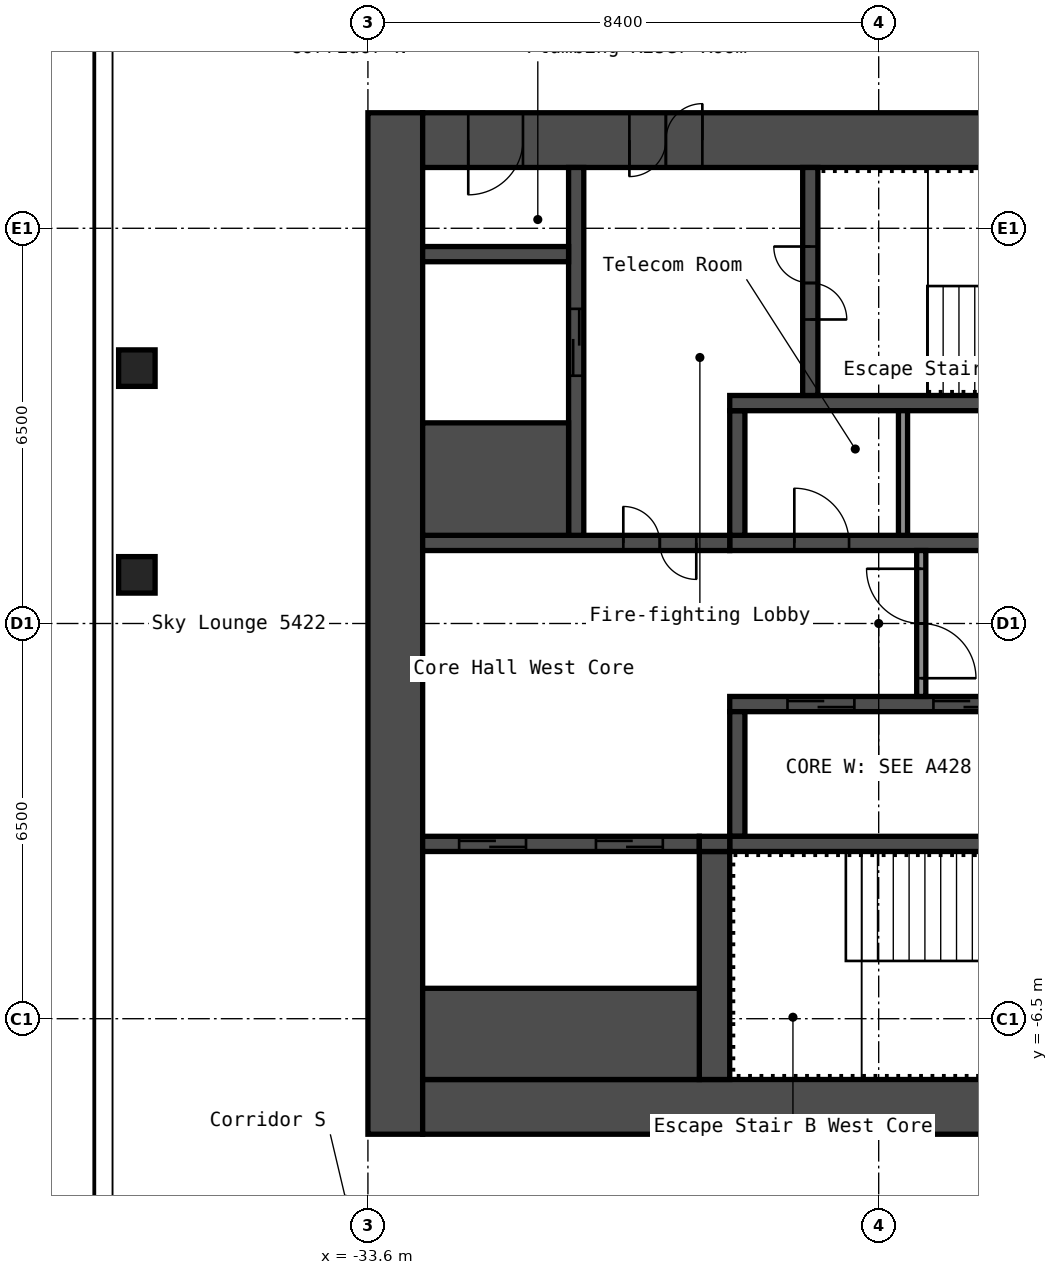
"""IFC4 building model, lengths in metres.
Left out: names, types, materials, properties, quantities, classifications, styles, units other than length and angle.
Written with IfcOpenShell. Run it as: python <this file> out.ifc"""

import sys

from ifc_helpers import new_model, si_unit, direction, frame, frame_2d, origin, origin_2d, place, context, subcontext, project, spatial, rectangle, hollow_rectangle, extrude, element, fill, save


model = new_model("IFC4")
c1 = context("Model", 3, precision=1e-05, world=origin(), true_north=direction((0.0, 1.0)))
c2 = subcontext(c1, "Body", "Model", "MODEL_VIEW")
j1 = project(units=[si_unit("LENGTHUNIT", "METRE"), si_unit("PLANEANGLEUNIT", "RADIAN")], contexts=[c1])
p1 = place(None, origin())
s1 = spatial("IfcSite", under=j1, at=p1, CompositionType="ELEMENT")
p2 = place(p1, origin())
s2 = spatial("IfcBuilding", under=s1, at=p2, CompositionType="ELEMENT")
p3 = place(p2, frame((0.0, 0.0, 193.0)))
s3 = spatial("IfcBuildingStorey", under=s2, at=p3, CompositionType="ELEMENT", Elevation=193.0)
for number, where, z_axis, x_axis in (
    (1, (-37.4, 0.8, 0.0), (0.0, 0.0, 1.0), (1.0, 0.0, 0.0)),
    (2, (-37.4, 4.2, 0.0), (0.0, 0.0, 1.0), (1.0, 0.0, 0.0)),
):
    element("IfcColumn", number, at=place(p3, frame(where, z_axis=z_axis, x_axis=x_axis)), inside=s3, PredefinedType="COLUMN", context=c2, shape_type="SweptSolid", body=[
        extrude(hollow_rectangle(XDim=0.6, YDim=0.6, WallThickness=0.025, InnerFilletRadius=0.038, OuterFilletRadius=0.062, at=origin_2d()), origin(), (0.0, 0.0, 1.0), 2.75),
    ])
p4 = place(p3, frame((-33.15, -8.4, 0.0), z_axis=(0.0, 0.0, 1.0), x_axis=(0.0, 1.0, 0.0)))
e3 = element("IfcWall", 3, at=p4, inside=s3, PredefinedType="SHEAR", context=c2, shape_type="SweptSolid", body=[
    extrude(rectangle(XDim=16.8, YDim=0.9, at=frame_2d((8.4, 0.0))), origin(), (0.0, 0.0, 1.0), 2.75),
])
p5 = place(p3, frame((-32.7, 7.95, 0.0), z_axis=(0.0, 0.0, 1.0), x_axis=(1.0, 0.0, 0.0)))
e4 = element("IfcWall", 4, at=p5, inside=s3, PredefinedType="SHEAR", context=c2, shape_type="SweptSolid", body=[
    extrude(rectangle(XDim=15.0, YDim=0.9, at=frame_2d((7.5, 0.0))), origin(), (0.0, 0.0, 1.0), 2.75),
])
p6 = place(p5, frame((3.4, 0.0, 0.0)))
e5 = element("IfcOpeningElement", 5, at=p6, cuts=e4, PredefinedType="OPENING", context=c2, shape_type="SweptSolid", body=[
    extrude(rectangle(XDim=1.2, YDim=2.1, at=frame_2d((0.6, 1.05))), frame((0.0, 0.46, 0.0), z_axis=(0.0, -1.0, 0.0), x_axis=(1.0, 0.0, 0.0)), (0.0, 0.0, 1.0), 0.92),
])
p7 = place(p5, frame((0.75, 0.0, 0.0)))
e6 = element("IfcOpeningElement", 6, at=p7, cuts=e4, PredefinedType="OPENING", context=c2, shape_type="SweptSolid", body=[
    extrude(rectangle(XDim=0.9, YDim=2.1, at=frame_2d((0.45, 1.05))), frame((0.0, 0.46, 0.0), z_axis=(0.0, -1.0, 0.0), x_axis=(1.0, 0.0, 0.0)), (0.0, 0.0, 1.0), 0.92),
])
p8 = place(p3, frame((-32.7, -7.95, 0.0), z_axis=(0.0, 0.0, 1.0), x_axis=(1.0, 0.0, 0.0)))
e7 = element("IfcWall", 7, at=p8, inside=s3, PredefinedType="SHEAR", context=c2, shape_type="SweptSolid", body=[
    extrude(rectangle(XDim=15.0, YDim=0.9, at=frame_2d((7.5, 0.0))), origin(), (0.0, 0.0, 1.0), 2.75),
])
p9 = place(p8, frame((11.45, 0.0, 0.0)))
e8 = element("IfcOpeningElement", 8, at=p9, cuts=e7, PredefinedType="OPENING", context=c2, shape_type="SweptSolid", body=[
    extrude(rectangle(XDim=1.0, YDim=2.1, at=frame_2d((0.5, 1.05))), frame((0.0, 0.46, 0.0), z_axis=(0.0, -1.0, 0.0), x_axis=(1.0, 0.0, 0.0)), (0.0, 0.0, 1.0), 0.92),
])
p10 = place(p3, frame((-27.65, 1.325, 0.0), z_axis=(0.0, 0.0, 1.0), x_axis=(1.0, 0.0, 0.0)))
e9 = element("IfcWall", 9, at=p10, inside=s3, PredefinedType="SHEAR", context=c2, shape_type="SweptSolid", body=[
    extrude(rectangle(XDim=7.5, YDim=0.25, at=frame_2d((3.75, 0.0))), origin(), (0.0, 0.0, 1.0), 2.75),
])
p11 = place(p10, frame((4.762, 0.0, 0.0)))
e10 = element("IfcOpeningElement", 10, at=p11, cuts=e9, PredefinedType="OPENING", context=c2, shape_type="SweptSolid", body=[
    extrude(rectangle(XDim=0.9, YDim=2.1, at=frame_2d((0.45, 1.05))), frame((0.0, 0.135, 0.0), z_axis=(0.0, -1.0, 0.0), x_axis=(1.0, 0.0, 0.0)), (0.0, 0.0, 1.0), 0.27),
])
p12 = place(p10, frame((1.062, 0.0, 0.0)))
e11 = element("IfcOpeningElement", 11, at=p12, cuts=e9, PredefinedType="OPENING", context=c2, shape_type="SweptSolid", body=[
    extrude(rectangle(XDim=0.9, YDim=2.1, at=frame_2d((0.45, 1.05))), frame((0.0, 0.135, 0.0), z_axis=(0.0, -1.0, 0.0), x_axis=(1.0, 0.0, 0.0)), (0.0, 0.0, 1.0), 0.27),
])
p13 = place(p3, frame((-27.525, 1.45, 0.0), z_axis=(0.0, 0.0, 1.0), x_axis=(0.0, 1.0, 0.0)))
e12 = element("IfcWall", 12, at=p13, inside=s3, PredefinedType="SHEAR", context=c2, shape_type="SweptSolid", body=[
    extrude(rectangle(XDim=2.05, YDim=0.25, at=frame_2d((1.025, 0.0))), origin(), (0.0, 0.0, 1.0), 2.75),
])
p14 = place(p3, frame((-27.65, 3.625, 0.0), z_axis=(0.0, 0.0, 1.0), x_axis=(1.0, 0.0, 0.0)))
e13 = element("IfcWall", 13, at=p14, inside=s3, PredefinedType="SHEAR", context=c2, shape_type="SweptSolid", body=[
    extrude(rectangle(XDim=7.5, YDim=0.25, at=frame_2d((3.75, 0.0))), origin(), (0.0, 0.0, 1.0), 2.75),
])
p15 = place(p3, frame((-26.325, 3.75, 0.0), z_axis=(0.0, 0.0, 1.0), x_axis=(0.0, 1.0, 0.0)))
e14 = element("IfcWall", 14, at=p15, inside=s3, PredefinedType="SHEAR", context=c2, shape_type="SweptSolid", body=[
    extrude(rectangle(XDim=3.75, YDim=0.25, at=frame_2d((1.875, 0.0))), origin(), (0.0, 0.0, 1.0), 2.75),
])
p16 = place(p15, frame((1.25, 0.0, 0.0)))
e15 = element("IfcOpeningElement", 15, at=p16, cuts=e14, PredefinedType="OPENING", context=c2, shape_type="SweptSolid", body=[
    extrude(rectangle(XDim=1.2, YDim=2.1, at=frame_2d((0.6, 1.05))), frame((0.0, 0.135, 0.0), z_axis=(0.0, -1.0, 0.0), x_axis=(1.0, 0.0, 0.0)), (0.0, 0.0, 1.0), 0.27),
])
p17 = place(p3, frame((-32.7, 1.325, 0.0), z_axis=(0.0, 0.0, 1.0), x_axis=(1.0, 0.0, 0.0)))
e16 = element("IfcWall", 16, at=p17, inside=s3, PredefinedType="SHEAR", context=c2, shape_type="SweptSolid", body=[
    extrude(rectangle(XDim=5.05, YDim=0.25, at=frame_2d((2.525, 0.0))), origin(), (0.0, 0.0, 1.0), 2.75),
])
p18 = place(p17, frame((3.3, 0.0, 0.0)))
e17 = element("IfcOpeningElement", 17, at=p18, cuts=e16, PredefinedType="OPENING", context=c2, shape_type="SweptSolid", body=[
    extrude(rectangle(XDim=1.2, YDim=2.1, at=frame_2d((0.6, 1.05))), frame((0.0, 0.135, 0.0), z_axis=(0.0, -1.0, 0.0), x_axis=(1.0, 0.0, 0.0)), (0.0, 0.0, 1.0), 0.27),
])
p19 = place(p3, frame((-30.175, 1.45, 0.0), z_axis=(0.0, 0.0, 1.0), x_axis=(0.0, 1.0, 0.0)))
e18 = element("IfcWall", 18, at=p19, inside=s3, PredefinedType="SHEAR", context=c2, shape_type="SweptSolid", body=[
    extrude(rectangle(XDim=6.05, YDim=0.25, at=frame_2d((3.025, 0.0))), origin(), (0.0, 0.0, 1.0), 2.75),
])
p20 = place(p19, frame((2.625, 0.0, 0.0)))
e19 = element("IfcOpeningElement", 19, at=p20, cuts=e18, PredefinedType="OPENING", context=c2, shape_type="SweptSolid", body=[
    extrude(rectangle(XDim=1.1, YDim=2.1, at=frame_2d((0.55, 1.05))), frame((0.0, 0.135, 0.0), z_axis=(0.0, -1.0, 0.0), x_axis=(1.0, 0.0, 0.0)), (0.0, 0.0, 1.0), 0.27),
])
p21 = place(p3, frame((-32.7, 2.375, 0.0), z_axis=(0.0, 0.0, 1.0), x_axis=(1.0, 0.0, 0.0)))
e20 = element("IfcWall", 20, at=p21, inside=s3, PredefinedType="SHEAR", context=c2, shape_type="SweptSolid", body=[
    extrude(rectangle(XDim=2.4, YDim=1.85, at=frame_2d((1.2, 0.0))), origin(), (0.0, 0.0, 1.0), 2.75),
])
p22 = place(p3, frame((-32.7, 6.075, 0.0), z_axis=(0.0, 0.0, 1.0), x_axis=(1.0, 0.0, 0.0)))
e21 = element("IfcWall", 21, at=p22, inside=s3, PredefinedType="SHEAR", context=c2, shape_type="SweptSolid", body=[
    extrude(rectangle(XDim=2.4, YDim=0.25, at=frame_2d((1.2, 0.0))), origin(), (0.0, 0.0, 1.0), 2.75),
])
p23 = place(p3, frame((-27.65, -1.325, 0.0), z_axis=(0.0, 0.0, 1.0), x_axis=(1.0, 0.0, 0.0)))
e22 = element("IfcWall", 22, at=p23, inside=s3, PredefinedType="SHEAR", context=c2, shape_type="SweptSolid", body=[
    extrude(rectangle(XDim=7.5, YDim=0.25, at=frame_2d((3.75, 0.0))), origin(), (0.0, 0.0, 1.0), 2.75),
])
p24 = place(p23, frame((5.75, 0.0, 0.0)))
e23 = element("IfcOpeningElement", 23, at=p24, cuts=e22, PredefinedType="OPENING", context=c2, shape_type="SweptSolid", body=[
    extrude(rectangle(XDim=1.1, YDim=2.1, at=frame_2d((0.55, 1.05))), frame((0.0, 0.135, 0.0), z_axis=(0.0, -1.0, 0.0), x_axis=(1.0, 0.0, 0.0)), (0.0, 0.0, 1.0), 0.27),
])
p25 = place(p23, frame((3.35, 0.0, 0.0)))
e24 = element("IfcOpeningElement", 24, at=p25, cuts=e22, PredefinedType="OPENING", context=c2, shape_type="SweptSolid", body=[
    extrude(rectangle(XDim=1.1, YDim=2.1, at=frame_2d((0.55, 1.05))), frame((0.0, 0.135, 0.0), z_axis=(0.0, -1.0, 0.0), x_axis=(1.0, 0.0, 0.0)), (0.0, 0.0, 1.0), 0.27),
])
p26 = place(p23, frame((0.95, 0.0, 0.0)))
e25 = element("IfcOpeningElement", 25, at=p26, cuts=e22, PredefinedType="OPENING", context=c2, shape_type="SweptSolid", body=[
    extrude(rectangle(XDim=1.1, YDim=2.1, at=frame_2d((0.55, 1.05))), frame((0.0, 0.135, 0.0), z_axis=(0.0, -1.0, 0.0), x_axis=(1.0, 0.0, 0.0)), (0.0, 0.0, 1.0), 0.27),
])
p27 = place(p3, frame((-27.525, -3.5, 0.0), z_axis=(0.0, 0.0, 1.0), x_axis=(0.0, 1.0, 0.0)))
e26 = element("IfcWall", 26, at=p27, inside=s3, PredefinedType="SHEAR", context=c2, shape_type="SweptSolid", body=[
    extrude(rectangle(XDim=2.05, YDim=0.25, at=frame_2d((1.025, 0.0))), origin(), (0.0, 0.0, 1.0), 2.75),
])
p28 = place(p3, frame((-27.65, -3.625, 0.0), z_axis=(0.0, 0.0, 1.0), x_axis=(1.0, 0.0, 0.0)))
e27 = element("IfcWall", 27, at=p28, inside=s3, PredefinedType="SHEAR", context=c2, shape_type="SweptSolid", body=[
    extrude(rectangle(XDim=7.5, YDim=0.25, at=frame_2d((3.75, 0.0))), origin(), (0.0, 0.0, 1.0), 2.75),
])
p29 = place(p3, frame((-27.9, -7.5, 0.0), z_axis=(0.0, 0.0, 1.0), x_axis=(0.0, 1.0, 0.0)))
e28 = element("IfcWall", 28, at=p29, inside=s3, PredefinedType="SHEAR", context=c2, shape_type="SweptSolid", body=[
    extrude(rectangle(XDim=3.75, YDim=0.5, at=frame_2d((1.875, 0.0))), origin(), (0.0, 0.0, 1.0), 2.75),
])
p30 = place(p3, frame((-32.7, -3.625, 0.0), z_axis=(0.0, 0.0, 1.0), x_axis=(1.0, 0.0, 0.0)))
e29 = element("IfcWall", 29, at=p30, inside=s3, PredefinedType="SHEAR", context=c2, shape_type="SweptSolid", body=[
    extrude(rectangle(XDim=4.55, YDim=0.25, at=frame_2d((2.275, 0.0))), origin(), (0.0, 0.0, 1.0), 2.75),
])
p31 = place(p30, frame((2.85, 0.0, 0.0)))
e30 = element("IfcOpeningElement", 30, at=p31, cuts=e29, PredefinedType="OPENING", context=c2, shape_type="SweptSolid", body=[
    extrude(rectangle(XDim=1.1, YDim=2.1, at=frame_2d((0.55, 1.05))), frame((0.0, 0.135, 0.0), z_axis=(0.0, -1.0, 0.0), x_axis=(1.0, 0.0, 0.0)), (0.0, 0.0, 1.0), 0.27),
])
p32 = place(p30, frame((0.6, 0.0, 0.0)))
e31 = element("IfcOpeningElement", 31, at=p32, cuts=e29, PredefinedType="OPENING", context=c2, shape_type="SweptSolid", body=[
    extrude(rectangle(XDim=1.1, YDim=2.1, at=frame_2d((0.55, 1.05))), frame((0.0, 0.135, 0.0), z_axis=(0.0, -1.0, 0.0), x_axis=(1.0, 0.0, 0.0)), (0.0, 0.0, 1.0), 0.27),
])
p33 = place(p3, frame((-32.7, -6.75, 0.0), z_axis=(0.0, 0.0, 1.0), x_axis=(1.0, 0.0, 0.0)))
e32 = element("IfcWall", 32, at=p33, inside=s3, PredefinedType="SHEAR", context=c2, shape_type="SweptSolid", body=[
    extrude(rectangle(XDim=4.55, YDim=1.5, at=frame_2d((2.275, 0.0))), origin(), (0.0, 0.0, 1.0), 2.75),
])
p34 = place(p3, frame((-28.15, -3.625, 0.0), z_axis=(0.0, 0.0, 1.0), x_axis=(1.0, 0.0, 0.0)))
e33 = element("IfcWall", 33, at=p34, inside=s3, PredefinedType="SHEAR", context=c2, shape_type="SweptSolid", body=[
    extrude(rectangle(XDim=0.5, YDim=0.25, at=frame_2d((0.25, 0.0))), origin(), (0.0, 0.0, 1.0), 2.75),
])
p35 = place(p3, frame((-24.5, -1.2, 0.0), z_axis=(0.0, 0.0, 1.0), x_axis=(0.0, 1.0, 0.0)))
e34 = element("IfcWall", 34, at=p35, inside=s3, PredefinedType="PARTITIONING", context=c2, shape_type="SweptSolid", body=[
    extrude(rectangle(XDim=2.4, YDim=0.15, at=frame_2d((1.2, 0.0))), origin(), (0.0, 0.0, 1.0), 2.75),
])
p36 = place(p35, frame((0.3, 0.0, 0.0)))
e35 = element("IfcOpeningElement", 35, at=p36, cuts=e34, PredefinedType="OPENING", context=c2, shape_type="SweptSolid", body=[
    extrude(rectangle(XDim=1.8, YDim=2.1, at=frame_2d((0.9, 1.05))), frame((0.0, 0.085, 0.0), z_axis=(0.0, -1.0, 0.0), x_axis=(1.0, 0.0, 0.0)), (0.0, 0.0, 1.0), 0.17),
])
p37 = place(p3, frame((-24.8, 1.45, 0.0), z_axis=(0.0, 0.0, 1.0), x_axis=(0.0, 1.0, 0.0)))
e36 = element("IfcWall", 36, at=p37, inside=s3, PredefinedType="PARTITIONING", context=c2, shape_type="SweptSolid", body=[
    extrude(rectangle(XDim=2.05, YDim=0.15, at=frame_2d((1.025, 0.0))), origin(), (0.0, 0.0, 1.0), 2.75),
])
p38 = place(p6, origin())
e37 = element("IfcDoor", 37, at=p38, inside=s3, OperationType="DOUBLE_DOOR_SINGLE_SWING", PredefinedType="DOOR", context=c2, shape_type="SweptSolid", body=[
    extrude(rectangle(XDim=1.2, YDim=2.1, at=frame_2d((0.6, 1.05))), frame((0.0, 0.025, 0.0), z_axis=(0.0, -1.0, 0.0), x_axis=(1.0, 0.0, 0.0)), (0.0, 0.0, 1.0), 0.05),
])
fill(e5, e37)
p39 = place(p7, origin())
e38 = element("IfcDoor", 38, at=p39, inside=s3, OperationType="SINGLE_SWING_LEFT", PredefinedType="DOOR", context=c2, shape_type="SweptSolid", body=[
    extrude(rectangle(XDim=0.9, YDim=2.1, at=frame_2d((0.45, 1.05))), frame((0.0, 0.025, 0.0), z_axis=(0.0, -1.0, 0.0), x_axis=(1.0, 0.0, 0.0)), (0.0, 0.0, 1.0), 0.05),
])
fill(e6, e38)
p40 = place(p16, origin())
e39 = element("IfcDoor", 39, at=p40, inside=s3, OperationType="DOUBLE_DOOR_SINGLE_SWING", PredefinedType="DOOR", context=c2, shape_type="SweptSolid", body=[
    extrude(rectangle(XDim=1.2, YDim=2.1, at=frame_2d((0.6, 1.05))), frame((0.0, 0.025, 0.0), z_axis=(0.0, -1.0, 0.0), x_axis=(1.0, 0.0, 0.0)), (0.0, 0.0, 1.0), 0.05),
])
fill(e15, e39)
p41 = place(p18, origin())
e40 = element("IfcDoor", 40, at=p41, inside=s3, OperationType="DOUBLE_DOOR_SINGLE_SWING", PredefinedType="DOOR", context=c2, shape_type="SweptSolid", body=[
    extrude(rectangle(XDim=1.2, YDim=2.1, at=frame_2d((0.6, 1.05))), frame((0.0, 0.025, 0.0), z_axis=(0.0, -1.0, 0.0), x_axis=(1.0, 0.0, 0.0)), (0.0, 0.0, 1.0), 0.05),
])
fill(e17, e40)
p42 = place(p36, origin())
e41 = element("IfcDoor", 41, at=p42, inside=s3, OperationType="DOUBLE_DOOR_SINGLE_SWING", PredefinedType="DOOR", context=c2, shape_type="SweptSolid", body=[
    extrude(rectangle(XDim=1.8, YDim=2.1, at=frame_2d((0.9, 1.05))), frame((0.0, 0.025, 0.0), z_axis=(0.0, -1.0, 0.0), x_axis=(1.0, 0.0, 0.0)), (0.0, 0.0, 1.0), 0.05),
])
fill(e35, e41)
p43 = place(p12, origin())
e42 = element("IfcDoor", 42, at=p43, inside=s3, OperationType="SINGLE_SWING_RIGHT", PredefinedType="DOOR", context=c2, shape_type="SweptSolid", body=[
    extrude(rectangle(XDim=0.9, YDim=2.1, at=frame_2d((0.45, 1.05))), frame((0.0, 0.025, 0.0), z_axis=(0.0, -1.0, 0.0), x_axis=(1.0, 0.0, 0.0)), (0.0, 0.0, 1.0), 0.05),
])
fill(e11, e42)
p44 = place(p25, origin())
e43 = element("IfcDoor", 43, at=p44, inside=s3, OperationType="DOUBLE_DOOR_SLIDING", PredefinedType="DOOR", context=c2, shape_type="SweptSolid", body=[
    extrude(rectangle(XDim=1.1, YDim=2.1, at=frame_2d((0.55, 1.05))), frame((0.0, 0.025, 0.0), z_axis=(0.0, -1.0, 0.0), x_axis=(1.0, 0.0, 0.0)), (0.0, 0.0, 1.0), 0.05),
])
fill(e24, e43)
p45 = place(p26, origin())
e44 = element("IfcDoor", 44, at=p45, inside=s3, OperationType="DOUBLE_DOOR_SLIDING", PredefinedType="DOOR", context=c2, shape_type="SweptSolid", body=[
    extrude(rectangle(XDim=1.1, YDim=2.1, at=frame_2d((0.55, 1.05))), frame((0.0, 0.025, 0.0), z_axis=(0.0, -1.0, 0.0), x_axis=(1.0, 0.0, 0.0)), (0.0, 0.0, 1.0), 0.05),
])
fill(e25, e44)
p46 = place(p20, origin())
e45 = element("IfcDoor", 45, at=p46, inside=s3, OperationType="DOUBLE_DOOR_SLIDING", PredefinedType="DOOR", context=c2, shape_type="SweptSolid", body=[
    extrude(rectangle(XDim=1.1, YDim=2.1, at=frame_2d((0.55, 1.05))), frame((0.0, 0.025, 0.0), z_axis=(0.0, -1.0, 0.0), x_axis=(1.0, 0.0, 0.0)), (0.0, 0.0, 1.0), 0.05),
])
fill(e19, e45)
p47 = place(p31, origin())
e46 = element("IfcDoor", 46, at=p47, inside=s3, OperationType="DOUBLE_DOOR_SLIDING", PredefinedType="DOOR", context=c2, shape_type="SweptSolid", body=[
    extrude(rectangle(XDim=1.1, YDim=2.1, at=frame_2d((0.55, 1.05))), frame((0.0, 0.025, 0.0), z_axis=(0.0, -1.0, 0.0), x_axis=(1.0, 0.0, 0.0)), (0.0, 0.0, 1.0), 0.05),
])
fill(e30, e46)
p48 = place(p32, origin())
e47 = element("IfcDoor", 47, at=p48, inside=s3, OperationType="DOUBLE_DOOR_SLIDING", PredefinedType="DOOR", context=c2, shape_type="SweptSolid", body=[
    extrude(rectangle(XDim=1.1, YDim=2.1, at=frame_2d((0.55, 1.05))), frame((0.0, 0.025, 0.0), z_axis=(0.0, -1.0, 0.0), x_axis=(1.0, 0.0, 0.0)), (0.0, 0.0, 1.0), 0.05),
])
fill(e31, e47)
save(model, sys.argv[1])
